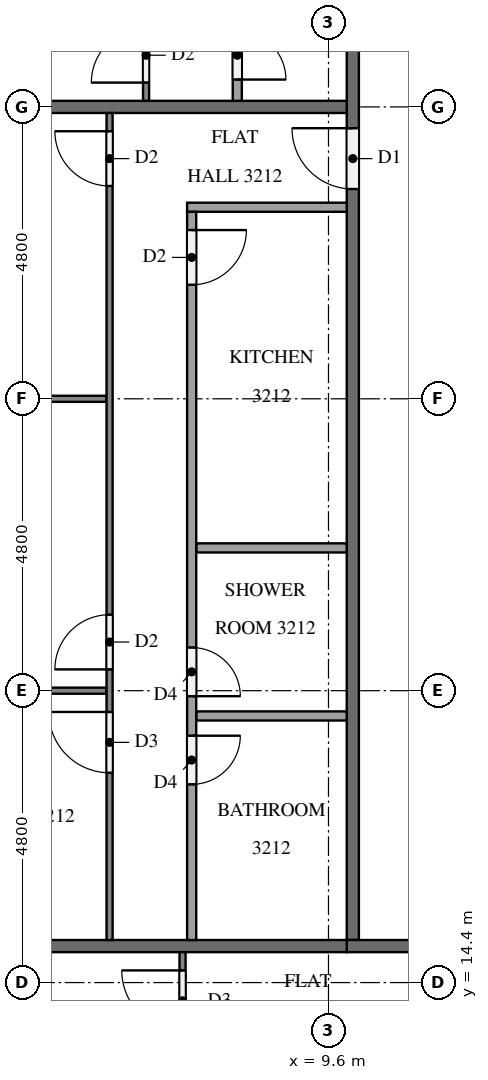
"""IFC4 building model, lengths in metres.
Left out: names, types, materials, properties, quantities, classifications, styles, units other than length and angle.
Written with IfcOpenShell. Run it as: python <this file> out.ifc"""

import sys

from ifc_helpers import new_model, si_unit, direction, frame, frame_2d, origin, place, context, subcontext, project, spatial, rectangle, extrude, element, fill, save


model = new_model("IFC4")
c1 = context("Model", 3, precision=1e-05, world=origin(), true_north=direction((0.0, 1.0)))
c2 = subcontext(c1, "Body", "Model", "MODEL_VIEW")
j1 = project(units=[si_unit("LENGTHUNIT", "METRE"), si_unit("PLANEANGLEUNIT", "RADIAN")], contexts=[c1])
p1 = place(None, origin())
s1 = spatial("IfcSite", under=j1, at=p1, CompositionType="ELEMENT")
p2 = place(p1, origin())
s2 = spatial("IfcBuilding", under=s1, at=p2, CompositionType="ELEMENT")
p3 = place(p2, frame((0.0, 0.0, 126.1)))
s3 = spatial("IfcBuildingStorey", under=s2, at=p3, CompositionType="ELEMENT", Elevation=126.1)
p4 = place(p3, frame((10.0, 15.1, 0.0), z_axis=(0.0, 0.0, 1.0), x_axis=(0.0, 1.0, 0.0)))
e1 = element("IfcWall", 1, at=p4, inside=s3, PredefinedType="PARTITIONING", context=c2, shape_type="SweptSolid", body=[
    extrude(rectangle(XDim=22.6, YDim=0.2, at=frame_2d((11.3, 0.0))), origin(), (0.0, 0.0, 1.0), 3.2),
])
p5 = place(p4, frame((21.35, 0.0, 0.0)))
e2 = element("IfcOpeningElement", 2, at=p5, cuts=e1, PredefinedType="OPENING", context=c2, shape_type="SweptSolid", body=[
    extrude(rectangle(XDim=1.0, YDim=2.1, at=frame_2d((0.5, 1.05))), frame((0.0, 0.11, 0.0), z_axis=(0.0, -1.0, 0.0), x_axis=(1.0, 0.0, 0.0)), (0.0, 0.0, 1.0), 0.22),
])
p6 = place(p4, frame((12.35, 0.0, 0.0)))
e3 = element("IfcOpeningElement", 3, at=p6, cuts=e1, PredefinedType="OPENING", context=c2, shape_type="SweptSolid", body=[
    extrude(rectangle(XDim=1.0, YDim=2.1, at=frame_2d((0.5, 1.05))), frame((0.0, 0.11, 0.0), z_axis=(0.0, -1.0, 0.0), x_axis=(1.0, 0.0, 0.0)), (0.0, 0.0, 1.0), 0.22),
])
p7 = place(p3, frame((9.9, 15.0, 0.0), z_axis=(0.0, 0.0, 1.0), x_axis=(1.0, 0.0, 0.0)))
e4 = element("IfcWall", 4, at=p7, inside=s3, PredefinedType="PARTITIONING", context=c2, shape_type="SweptSolid", body=[
    extrude(rectangle(XDim=2.2, YDim=0.2, at=frame_2d((1.1, 0.0))), origin(), (0.0, 0.0, 1.0), 3.2),
])
p8 = place(p3, frame((0.375, 28.8, 0.0), z_axis=(0.0, 0.0, 1.0), x_axis=(1.0, 0.0, 0.0)))
e5 = element("IfcWall", 5, at=p8, inside=s3, PredefinedType="PARTITIONING", context=c2, shape_type="SweptSolid", body=[
    extrude(rectangle(XDim=9.525, YDim=0.2, at=frame_2d((4.762, 0.0))), origin(), (0.0, 0.0, 1.0), 3.2),
])
p9 = place(p3, frame((0.1, 15.0, 0.0), z_axis=(0.0, 0.0, 1.0), x_axis=(1.0, 0.0, 0.0)))
e6 = element("IfcWall", 6, at=p9, inside=s3, PredefinedType="PARTITIONING", context=c2, shape_type="SweptSolid", body=[
    extrude(rectangle(XDim=9.8, YDim=0.2, at=frame_2d((4.9, 0.0))), origin(), (0.0, 0.0, 1.0), 3.2),
])
p10 = place(p3, frame((6.6, 28.9, 0.0), z_axis=(0.0, 0.0, 1.0), x_axis=(0.0, 1.0, 0.0)))
e7 = element("IfcWall", 7, at=p10, inside=s3, PredefinedType="PARTITIONING", context=c2, shape_type="SweptSolid", body=[
    extrude(rectangle(XDim=8.8, YDim=0.1, at=frame_2d((4.4, 0.0))), origin(), (0.0, 0.0, 1.0), 3.2),
])
p11 = place(p10, frame((7.5, 0.0, 0.0)))
e8 = element("IfcOpeningElement", 8, at=p11, cuts=e7, PredefinedType="OPENING", context=c2, shape_type="SweptSolid", body=[
    extrude(rectangle(XDim=1.0, YDim=2.1, at=frame_2d((0.5, 1.05))), frame((0.0, 0.06, 0.0), z_axis=(0.0, -1.0, 0.0), x_axis=(1.0, 0.0, 0.0)), (0.0, 0.0, 1.0), 0.12),
])
p12 = place(p10, frame((0.3, 0.0, 0.0)))
e9 = element("IfcOpeningElement", 9, at=p12, cuts=e7, PredefinedType="OPENING", context=c2, shape_type="SweptSolid", body=[
    extrude(rectangle(XDim=0.9, YDim=2.1, at=frame_2d((0.45, 1.05))), frame((0.0, 0.06, 0.0), z_axis=(0.0, -1.0, 0.0), x_axis=(1.0, 0.0, 0.0)), (0.0, 0.0, 1.0), 0.12),
])
p13 = place(p3, frame((8.1, 36.075, 0.0), z_axis=(0.0, 0.0, 1.0), x_axis=(0.0, -1.0, 0.0)))
e10 = element("IfcWall", 10, at=p13, inside=s3, PredefinedType="PARTITIONING", context=c2, shape_type="SweptSolid", body=[
    extrude(rectangle(XDim=7.175, YDim=0.15, at=frame_2d((3.587, 0.0))), origin(), (0.0, 0.0, 1.0), 3.2),
])
p14 = place(p13, frame((0.3, 0.0, 0.0)))
e11 = element("IfcOpeningElement", 11, at=p14, cuts=e10, PredefinedType="OPENING", context=c2, shape_type="SweptSolid", body=[
    extrude(rectangle(XDim=0.9, YDim=2.1, at=frame_2d((0.45, 1.05))), frame((0.0, 0.085, 0.0), z_axis=(0.0, -1.0, 0.0), x_axis=(1.0, 0.0, 0.0)), (0.0, 0.0, 1.0), 0.17),
])
p15 = place(p13, frame((6.025, 0.0, 0.0)))
e12 = element("IfcOpeningElement", 12, at=p15, cuts=e10, PredefinedType="OPENING", context=c2, shape_type="SweptSolid", body=[
    extrude(rectangle(XDim=0.8, YDim=2.1, at=frame_2d((0.4, 1.05))), frame((0.0, 0.085, 0.0), z_axis=(0.0, -1.0, 0.0), x_axis=(1.0, 0.0, 0.0)), (0.0, 0.0, 1.0), 0.17),
])
p16 = place(p3, frame((5.95, 24.0, 0.0), z_axis=(0.0, 0.0, 1.0), x_axis=(-1.0, 0.0, 0.0)))
e13 = element("IfcWall", 13, at=p16, inside=s3, PredefinedType="PARTITIONING", context=c2, shape_type="SweptSolid", body=[
    extrude(rectangle(XDim=5.85, YDim=0.1, at=frame_2d((2.925, 0.0))), origin(), (0.0, 0.0, 1.0), 3.2),
])
p17 = place(p3, frame((5.95, 19.2, 0.0), z_axis=(0.0, 0.0, 1.0), x_axis=(-1.0, 0.0, 0.0)))
e14 = element("IfcWall", 14, at=p17, inside=s3, PredefinedType="PARTITIONING", context=c2, shape_type="SweptSolid", body=[
    extrude(rectangle(XDim=5.575, YDim=0.1, at=frame_2d((2.788, 0.0))), origin(), (0.0, 0.0, 1.0), 3.2),
])
p18 = place(p3, frame((6.0, 15.1, 0.0), z_axis=(0.0, 0.0, 1.0), x_axis=(0.0, 1.0, 0.0)))
e15 = element("IfcWall", 15, at=p18, inside=s3, PredefinedType="PARTITIONING", context=c2, shape_type="SweptSolid", body=[
    extrude(rectangle(XDim=13.6, YDim=0.1, at=frame_2d((6.8, 0.0))), origin(), (0.0, 0.0, 1.0), 3.2),
])
p19 = place(p18, frame((12.4, 0.0, 0.0)))
e16 = element("IfcOpeningElement", 16, at=p19, cuts=e15, PredefinedType="OPENING", context=c2, shape_type="SweptSolid", body=[
    extrude(rectangle(XDim=0.9, YDim=2.1, at=frame_2d((0.45, 1.05))), frame((0.0, 0.06, 0.0), z_axis=(0.0, -1.0, 0.0), x_axis=(1.0, 0.0, 0.0)), (0.0, 0.0, 1.0), 0.12),
])
p20 = place(p18, frame((4.45, 0.0, 0.0)))
e17 = element("IfcOpeningElement", 17, at=p20, cuts=e15, PredefinedType="OPENING", context=c2, shape_type="SweptSolid", body=[
    extrude(rectangle(XDim=0.9, YDim=2.1, at=frame_2d((0.45, 1.05))), frame((0.0, 0.06, 0.0), z_axis=(0.0, -1.0, 0.0), x_axis=(1.0, 0.0, 0.0)), (0.0, 0.0, 1.0), 0.12),
])
p21 = place(p18, frame((2.75, 0.0, 0.0)))
e18 = element("IfcOpeningElement", 18, at=p21, cuts=e15, PredefinedType="OPENING", context=c2, shape_type="SweptSolid", body=[
    extrude(rectangle(XDim=1.0, YDim=2.1, at=frame_2d((0.5, 1.05))), frame((0.0, 0.06, 0.0), z_axis=(0.0, -1.0, 0.0), x_axis=(1.0, 0.0, 0.0)), (0.0, 0.0, 1.0), 0.12),
])
for number, where, z_axis, x_axis in (
    (19, (9.9, 21.548, 0.0), (0.0, 0.0, 1.0), (-1.0, 0.0, 0.0)),
    (20, (9.9, 18.785, 0.0), (0.0, 0.0, 1.0), (-1.0, 0.0, 0.0)),
):
    element("IfcWall", number, at=place(p3, frame(where, z_axis=z_axis, x_axis=x_axis)), inside=s3, PredefinedType="PARTITIONING", context=c2, shape_type="SweptSolid", body=[
        extrude(rectangle(XDim=2.475, YDim=0.15, at=frame_2d((1.237, 0.0))), origin(), (0.0, 0.0, 1.0), 3.2),
    ])
p22 = place(p3, frame((9.9, 27.15, 0.0), z_axis=(0.0, 0.0, 1.0), x_axis=(-1.0, 0.0, 0.0)))
e21 = element("IfcWall", 21, at=p22, inside=s3, PredefinedType="PARTITIONING", context=c2, shape_type="SweptSolid", body=[
    extrude(rectangle(XDim=2.625, YDim=0.15, at=frame_2d((1.312, 0.0))), origin(), (0.0, 0.0, 1.0), 3.2),
])
p23 = place(p3, frame((7.35, 27.075, 0.0), z_axis=(0.0, 0.0, 1.0), x_axis=(0.0, -1.0, 0.0)))
e22 = element("IfcWall", 22, at=p23, inside=s3, PredefinedType="PARTITIONING", context=c2, shape_type="SweptSolid", body=[
    extrude(rectangle(XDim=11.975, YDim=0.15, at=frame_2d((5.987, 0.0))), origin(), (0.0, 0.0, 1.0), 3.2),
])
p24 = place(p23, frame((0.3, 0.0, 0.0)))
e23 = element("IfcOpeningElement", 23, at=p24, cuts=e22, PredefinedType="OPENING", context=c2, shape_type="SweptSolid", body=[
    extrude(rectangle(XDim=0.9, YDim=2.1, at=frame_2d((0.45, 1.05))), frame((0.0, 0.085, 0.0), z_axis=(0.0, -1.0, 0.0), x_axis=(1.0, 0.0, 0.0)), (0.0, 0.0, 1.0), 0.17),
])
p25 = place(p23, frame((7.165, 0.0, 0.0)))
e24 = element("IfcOpeningElement", 24, at=p25, cuts=e22, PredefinedType="OPENING", context=c2, shape_type="SweptSolid", body=[
    extrude(rectangle(XDim=0.8, YDim=2.1, at=frame_2d((0.4, 1.05))), frame((0.0, 0.085, 0.0), z_axis=(0.0, -1.0, 0.0), x_axis=(1.0, 0.0, 0.0)), (0.0, 0.0, 1.0), 0.17),
])
p26 = place(p23, frame((8.615, 0.0, 0.0)))
e25 = element("IfcOpeningElement", 25, at=p26, cuts=e22, PredefinedType="OPENING", context=c2, shape_type="SweptSolid", body=[
    extrude(rectangle(XDim=0.8, YDim=2.1, at=frame_2d((0.4, 1.05))), frame((0.0, 0.085, 0.0), z_axis=(0.0, -1.0, 0.0), x_axis=(1.0, 0.0, 0.0)), (0.0, 0.0, 1.0), 0.17),
])
p27 = place(p3, frame((7.2, 4.9, 0.0), z_axis=(0.0, 0.0, 1.0), x_axis=(0.0, 1.0, 0.0)))
e26 = element("IfcWall", 26, at=p27, inside=s3, PredefinedType="PARTITIONING", context=c2, shape_type="SweptSolid", body=[
    extrude(rectangle(XDim=10.0, YDim=0.1, at=frame_2d((5.0, 0.0))), origin(), (0.0, 0.0, 1.0), 3.2),
])
p28 = place(p27, frame((8.7, 0.0, 0.0)))
e27 = element("IfcOpeningElement", 27, at=p28, cuts=e26, PredefinedType="OPENING", context=c2, shape_type="SweptSolid", body=[
    extrude(rectangle(XDim=1.0, YDim=2.1, at=frame_2d((0.5, 1.05))), frame((0.0, 0.06, 0.0), z_axis=(0.0, -1.0, 0.0), x_axis=(1.0, 0.0, 0.0)), (0.0, 0.0, 1.0), 0.12),
])
p29 = place(p27, frame((0.3, 0.0, 0.0)))
e28 = element("IfcOpeningElement", 28, at=p29, cuts=e26, PredefinedType="OPENING", context=c2, shape_type="SweptSolid", body=[
    extrude(rectangle(XDim=0.9, YDim=2.1, at=frame_2d((0.45, 1.05))), frame((0.0, 0.06, 0.0), z_axis=(0.0, -1.0, 0.0), x_axis=(1.0, 0.0, 0.0)), (0.0, 0.0, 1.0), 0.12),
])
p30 = place(p6, origin())
e29 = element("IfcDoor", 29, at=p30, inside=s3, OperationType="SINGLE_SWING_RIGHT", PredefinedType="DOOR", context=c2, shape_type="SweptSolid", body=[
    extrude(rectangle(XDim=1.0, YDim=2.1, at=frame_2d((0.5, 1.05))), frame((0.0, 0.025, 0.0), z_axis=(0.0, -1.0, 0.0), x_axis=(1.0, 0.0, 0.0)), (0.0, 0.0, 1.0), 0.05),
])
fill(e3, e29)
p31 = place(p12, origin())
e30 = element("IfcDoor", 30, at=p31, inside=s3, OperationType="SINGLE_SWING_LEFT", PredefinedType="DOOR", context=c2, shape_type="SweptSolid", body=[
    extrude(rectangle(XDim=0.9, YDim=2.1, at=frame_2d((0.45, 1.05))), frame((0.0, 0.025, 0.0), z_axis=(0.0, -1.0, 0.0), x_axis=(1.0, 0.0, 0.0)), (0.0, 0.0, 1.0), 0.05),
])
fill(e9, e30)
p32 = place(p15, origin())
e31 = element("IfcDoor", 31, at=p32, inside=s3, OperationType="SINGLE_SWING_RIGHT", PredefinedType="DOOR", context=c2, shape_type="SweptSolid", body=[
    extrude(rectangle(XDim=0.8, YDim=2.1, at=frame_2d((0.4, 1.05))), frame((0.0, 0.025, 0.0), z_axis=(0.0, -1.0, 0.0), x_axis=(1.0, 0.0, 0.0)), (0.0, 0.0, 1.0), 0.05),
])
fill(e12, e31)
p33 = place(p19, origin())
e32 = element("IfcDoor", 32, at=p33, inside=s3, OperationType="SINGLE_SWING_RIGHT", PredefinedType="DOOR", context=c2, shape_type="SweptSolid", body=[
    extrude(rectangle(XDim=0.9, YDim=2.1, at=frame_2d((0.45, 1.05))), frame((0.0, 0.025, 0.0), z_axis=(0.0, -1.0, 0.0), x_axis=(1.0, 0.0, 0.0)), (0.0, 0.0, 1.0), 0.05),
])
fill(e16, e32)
p34 = place(p20, origin())
e33 = element("IfcDoor", 33, at=p34, inside=s3, OperationType="SINGLE_SWING_LEFT", PredefinedType="DOOR", context=c2, shape_type="SweptSolid", body=[
    extrude(rectangle(XDim=0.9, YDim=2.1, at=frame_2d((0.45, 1.05))), frame((0.0, 0.025, 0.0), z_axis=(0.0, -1.0, 0.0), x_axis=(1.0, 0.0, 0.0)), (0.0, 0.0, 1.0), 0.05),
])
fill(e17, e33)
p35 = place(p21, origin())
e34 = element("IfcDoor", 34, at=p35, inside=s3, OperationType="SINGLE_SWING_RIGHT", PredefinedType="DOOR", context=c2, shape_type="SweptSolid", body=[
    extrude(rectangle(XDim=1.0, YDim=2.1, at=frame_2d((0.5, 1.05))), frame((0.0, 0.025, 0.0), z_axis=(0.0, -1.0, 0.0), x_axis=(1.0, 0.0, 0.0)), (0.0, 0.0, 1.0), 0.05),
])
fill(e18, e34)
p36 = place(p24, origin())
e35 = element("IfcDoor", 35, at=p36, inside=s3, OperationType="SINGLE_SWING_LEFT", PredefinedType="DOOR", context=c2, shape_type="SweptSolid", body=[
    extrude(rectangle(XDim=0.9, YDim=2.1, at=frame_2d((0.45, 1.05))), frame((0.0, 0.025, 0.0), z_axis=(0.0, -1.0, 0.0), x_axis=(1.0, 0.0, 0.0)), (0.0, 0.0, 1.0), 0.05),
])
fill(e23, e35)
p37 = place(p25, origin())
e36 = element("IfcDoor", 36, at=p37, inside=s3, OperationType="SINGLE_SWING_RIGHT", PredefinedType="DOOR", context=c2, shape_type="SweptSolid", body=[
    extrude(rectangle(XDim=0.8, YDim=2.1, at=frame_2d((0.4, 1.05))), frame((0.0, 0.025, 0.0), z_axis=(0.0, -1.0, 0.0), x_axis=(1.0, 0.0, 0.0)), (0.0, 0.0, 1.0), 0.05),
])
fill(e24, e36)
p38 = place(p26, origin())
e37 = element("IfcDoor", 37, at=p38, inside=s3, OperationType="SINGLE_SWING_LEFT", PredefinedType="DOOR", context=c2, shape_type="SweptSolid", body=[
    extrude(rectangle(XDim=0.8, YDim=2.1, at=frame_2d((0.4, 1.05))), frame((0.0, 0.025, 0.0), z_axis=(0.0, -1.0, 0.0), x_axis=(1.0, 0.0, 0.0)), (0.0, 0.0, 1.0), 0.05),
])
fill(e25, e37)
p39 = place(p28, origin())
e38 = element("IfcDoor", 38, at=p39, inside=s3, OperationType="SINGLE_SWING_RIGHT", PredefinedType="DOOR", context=c2, shape_type="SweptSolid", body=[
    extrude(rectangle(XDim=1.0, YDim=2.1, at=frame_2d((0.5, 1.05))), frame((0.0, 0.025, 0.0), z_axis=(0.0, -1.0, 0.0), x_axis=(1.0, 0.0, 0.0)), (0.0, 0.0, 1.0), 0.05),
])
fill(e27, e38)
save(model, sys.argv[1])
